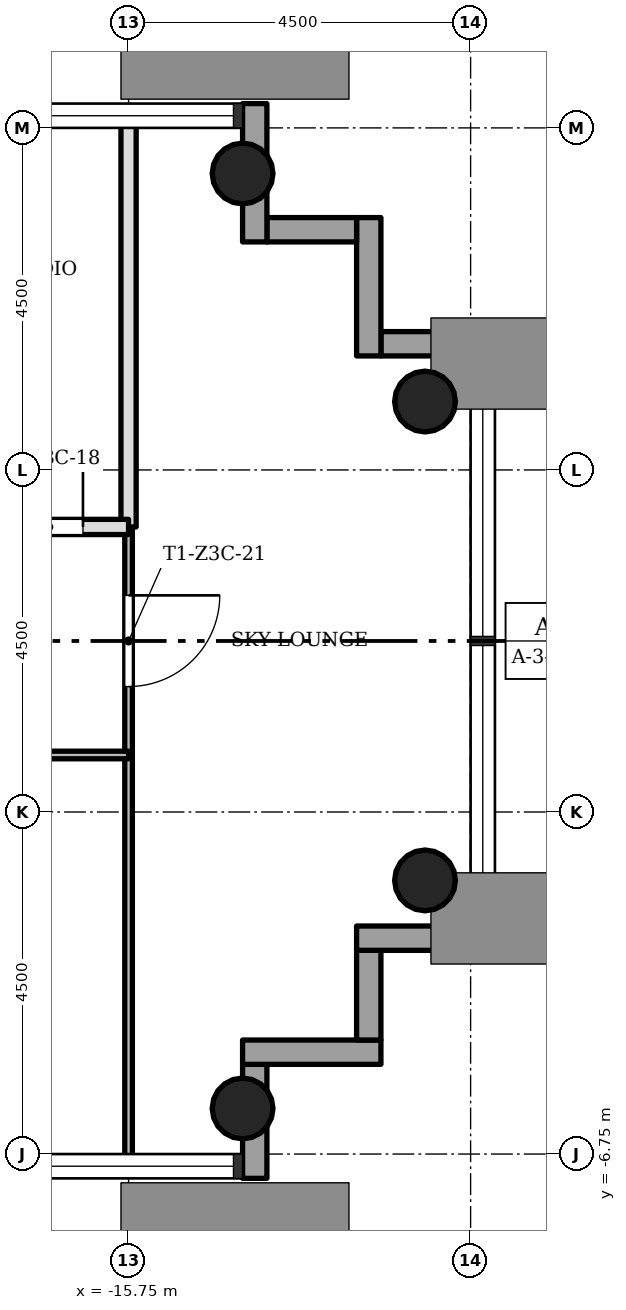
"""IFC4 building model, lengths in metres.
Left out: names, types, materials, properties, quantities, classifications, styles, units other than length and angle.
Written with IfcOpenShell. Run it as: python <this file> out.ifc"""

import sys

from ifc_helpers import new_model, si_unit, direction, frame, frame_2d, origin, origin_2d, place, context, subcontext, project, spatial, rectangle, hollow_circle, extrude, element, fill, save


model = new_model("IFC4")
c1 = context("Model", 3, precision=1e-05, world=origin(), true_north=direction((0.0, 1.0)))
c2 = subcontext(c1, "Body", "Model", "MODEL_VIEW")
j1 = project(units=[si_unit("LENGTHUNIT", "METRE"), si_unit("PLANEANGLEUNIT", "RADIAN")], contexts=[c1])
p1 = place(None, origin())
s1 = spatial("IfcSite", under=j1, at=p1, CompositionType="ELEMENT")
p2 = place(p1, origin())
s2 = spatial("IfcBuilding", under=s1, at=p2, CompositionType="ELEMENT")
p3 = place(p2, frame((0.0, 0.0, 157.5)))
s3 = spatial("IfcBuildingStorey", under=s2, at=p3, CompositionType="ELEMENT", Elevation=157.5)
for number, where, z_axis, x_axis in (
    (1, (-14.25, -6.15, 0.0), (0.0, 0.0, 1.0), (1.0, 0.0, 0.0)),
    (2, (-14.25, 6.15, 0.0), (0.0, 0.0, 1.0), (1.0, 0.0, 0.0)),
    (3, (-11.85, -3.15, 0.0), (0.0, 0.0, 1.0), (1.0, 0.0, 0.0)),
    (4, (-11.85, 3.15, 0.0), (0.0, 0.0, 1.0), (1.0, 0.0, 0.0)),
):
    element("IfcColumn", number, at=place(p3, frame(where, z_axis=z_axis, x_axis=x_axis)), inside=s3, PredefinedType="COLUMN", context=c2, shape_type="SweptSolid", body=[
        extrude(hollow_circle(Radius=0.4, WallThickness=0.028, at=origin_2d()), origin(), (0.0, 0.0, 1.0), 3.4),
    ])
p4 = place(p3, frame((-14.09, -7.07, -0.3), z_axis=(0.0, 0.0, 1.0), x_axis=(0.0, 1.0, 0.0)))
e5 = element("IfcWall", 5, at=p4, inside=s3, PredefinedType="STANDARD", context=c2, shape_type="SweptSolid", body=[
    extrude(rectangle(XDim=1.5, YDim=0.32, at=frame_2d((0.75, 0.0))), origin(), (0.0, 0.0, 1.0), 3.4),
])
p5 = place(p3, frame((-14.25, -5.41, -0.3), z_axis=(0.0, 0.0, 1.0), x_axis=(1.0, 0.0, 0.0)))
e6 = element("IfcWall", 6, at=p5, inside=s3, PredefinedType="STANDARD", context=c2, shape_type="SweptSolid", body=[
    extrude(rectangle(XDim=1.82, YDim=0.32, at=frame_2d((0.91, 0.0))), origin(), (0.0, 0.0, 1.0), 3.4),
])
p6 = place(p3, frame((-12.59, -5.25, -0.3), z_axis=(0.0, 0.0, 1.0), x_axis=(0.0, 1.0, 0.0)))
e7 = element("IfcWall", 7, at=p6, inside=s3, PredefinedType="STANDARD", context=c2, shape_type="SweptSolid", body=[
    extrude(rectangle(XDim=1.18, YDim=0.32, at=frame_2d((0.59, 0.0))), origin(), (0.0, 0.0, 1.0), 3.4),
])
p7 = place(p3, frame((-12.75, -3.91, -0.3), z_axis=(0.0, 0.0, 1.0), x_axis=(1.0, 0.0, 0.0)))
e8 = element("IfcWall", 8, at=p7, inside=s3, PredefinedType="STANDARD", context=c2, shape_type="SweptSolid", body=[
    extrude(rectangle(XDim=1.82, YDim=0.32, at=frame_2d((0.91, 0.0))), origin(), (0.0, 0.0, 1.0), 3.4),
])
p8 = place(p3, frame((-10.93, 3.91, -0.3), z_axis=(0.0, 0.0, 1.0), x_axis=(-1.0, 0.0, 0.0)))
e9 = element("IfcWall", 9, at=p8, inside=s3, PredefinedType="STANDARD", context=c2, shape_type="SweptSolid", body=[
    extrude(rectangle(XDim=1.5, YDim=0.32, at=frame_2d((0.75, 0.0))), origin(), (0.0, 0.0, 1.0), 3.4),
])
p9 = place(p3, frame((-12.59, 3.75, -0.3), z_axis=(0.0, 0.0, 1.0), x_axis=(0.0, 1.0, 0.0)))
e10 = element("IfcWall", 10, at=p9, inside=s3, PredefinedType="STANDARD", context=c2, shape_type="SweptSolid", body=[
    extrude(rectangle(XDim=1.82, YDim=0.32, at=frame_2d((0.91, 0.0))), origin(), (0.0, 0.0, 1.0), 3.4),
])
p10 = place(p3, frame((-12.75, 5.41, -0.3), z_axis=(0.0, 0.0, 1.0), x_axis=(-1.0, 0.0, 0.0)))
e11 = element("IfcWall", 11, at=p10, inside=s3, PredefinedType="STANDARD", context=c2, shape_type="SweptSolid", body=[
    extrude(rectangle(XDim=1.18, YDim=0.32, at=frame_2d((0.59, 0.0))), origin(), (0.0, 0.0, 1.0), 3.4),
])
p11 = place(p3, frame((-14.09, 5.25, -0.3), z_axis=(0.0, 0.0, 1.0), x_axis=(0.0, 1.0, 0.0)))
e12 = element("IfcWall", 12, at=p11, inside=s3, PredefinedType="STANDARD", context=c2, shape_type="SweptSolid", body=[
    extrude(rectangle(XDim=1.82, YDim=0.32, at=frame_2d((0.91, 0.0))), origin(), (0.0, 0.0, 1.0), 3.4),
])
p12 = place(p3, frame((-15.75, -6.85, 0.0), z_axis=(0.0, 0.0, 1.0), x_axis=(0.0, 1.0, 0.0)))
e13 = element("IfcWall", 13, at=p12, inside=s3, PredefinedType="PARTITIONING", context=c2, shape_type="SweptSolid", body=[
    extrude(rectangle(XDim=8.35, YDim=0.1, at=frame_2d((4.175, 0.0))), origin(), (0.0, 0.0, 1.0), 3.0),
])
p13 = place(p12, frame((6.25, 0.0, 0.0)))
e14 = element("IfcOpeningElement", 14, at=p13, cuts=e13, PredefinedType="OPENING", context=c2, shape_type="SweptSolid", body=[
    extrude(rectangle(XDim=1.2, YDim=2.1, at=frame_2d((0.6, 1.05))), frame((0.0, 0.06, 0.0), z_axis=(0.0, -1.0, 0.0), x_axis=(1.0, 0.0, 0.0)), (0.0, 0.0, 1.0), 0.12),
])
p14 = place(p3, frame((-15.75, 1.5, 0.0), z_axis=(0.0, 0.0, 1.0), x_axis=(0.0, 1.0, 0.0)))
e15 = element("IfcWall", 15, at=p14, inside=s3, PredefinedType="SOLIDWALL", context=c2, shape_type="SweptSolid", body=[
    extrude(rectangle(XDim=5.35, YDim=0.2, at=frame_2d((2.675, 0.0))), origin(), (0.0, 0.0, 1.0), 3.0),
])
p15 = place(p3, frame((-20.25, -1.5, 0.0), z_axis=(0.0, 0.0, 1.0), x_axis=(1.0, 0.0, 0.0)))
e16 = element("IfcWall", 16, at=p15, inside=s3, PredefinedType="PARTITIONING", context=c2, shape_type="SweptSolid", body=[
    extrude(rectangle(XDim=4.5, YDim=0.1, at=frame_2d((2.25, 0.0))), origin(), (0.0, 0.0, 1.0), 3.0),
])
p16 = place(p15, frame((1.8, 0.0, 0.0)))
e17 = element("IfcOpeningElement", 17, at=p16, cuts=e16, PredefinedType="OPENING", context=c2, shape_type="SweptSolid", body=[
    extrude(rectangle(XDim=0.9, YDim=2.1, at=frame_2d((0.45, 1.05))), frame((0.0, 0.06, 0.0), z_axis=(0.0, -1.0, 0.0), x_axis=(1.0, 0.0, 0.0)), (0.0, 0.0, 1.0), 0.12),
])
p17 = place(p3, frame((-20.25, 1.5, 0.0), z_axis=(0.0, 0.0, 1.0), x_axis=(1.0, 0.0, 0.0)))
e18 = element("IfcWall", 18, at=p17, inside=s3, PredefinedType="SOLIDWALL", context=c2, shape_type="SweptSolid", body=[
    extrude(rectangle(XDim=4.5, YDim=0.2, at=frame_2d((2.25, 0.0))), origin(), (0.0, 0.0, 1.0), 3.0),
])
p18 = place(p17, frame((3.0, 0.0, 0.0)))
e19 = element("IfcOpeningElement", 19, at=p18, cuts=e18, PredefinedType="OPENING", context=c2, shape_type="SweptSolid", body=[
    extrude(rectangle(XDim=0.9, YDim=2.1, at=frame_2d((0.45, 1.05))), frame((0.0, 0.11, 0.0), z_axis=(0.0, -1.0, 0.0), x_axis=(1.0, 0.0, 0.0)), (0.0, 0.0, 1.0), 0.22),
])
p19 = place(p18, origin())
e20 = element("IfcDoor", 20, at=p19, inside=s3, OperationType="SINGLE_SWING_LEFT", PredefinedType="DOOR", context=c2, shape_type="SweptSolid", body=[
    extrude(rectangle(XDim=0.9, YDim=2.1, at=frame_2d((0.45, 1.05))), frame((0.0, 0.025, 0.0), z_axis=(0.0, -1.0, 0.0), x_axis=(1.0, 0.0, 0.0)), (0.0, 0.0, 1.0), 0.05),
])
fill(e19, e20)
p20 = place(p13, origin())
e21 = element("IfcDoor", 21, at=p20, inside=s3, OperationType="SINGLE_SWING_RIGHT", PredefinedType="DOOR", context=c2, shape_type="SweptSolid", body=[
    extrude(rectangle(XDim=1.2, YDim=2.1, at=frame_2d((0.6, 1.05))), frame((0.0, 0.025, 0.0), z_axis=(0.0, -1.0, 0.0), x_axis=(1.0, 0.0, 0.0)), (0.0, 0.0, 1.0), 0.05),
])
fill(e14, e21)
save(model, sys.argv[1])
